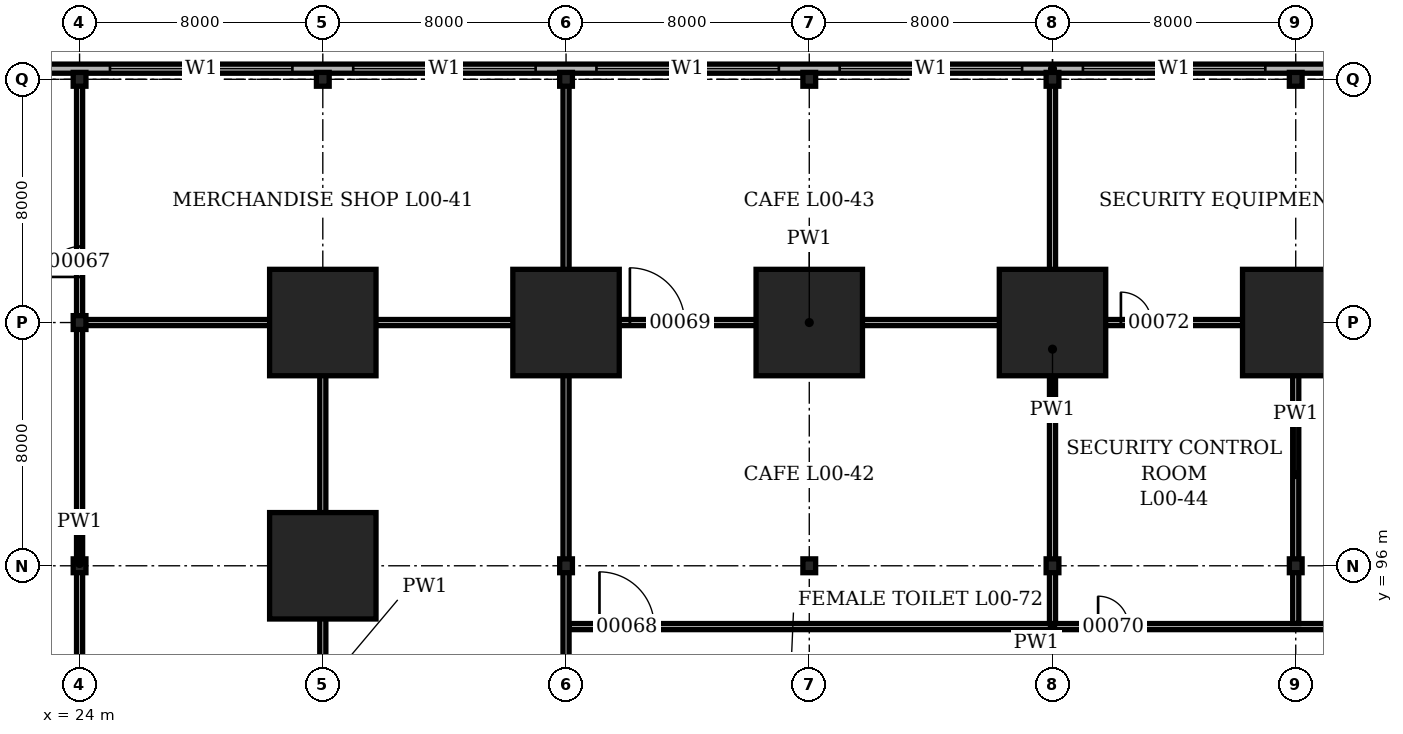
"""IFC4 building model, lengths in metres.
Left out: names, types, materials, properties, quantities, classifications, styles, units other than length and angle.
Written with IfcOpenShell. Run it as: python <this file> out.ifc"""

import sys

from ifc_helpers import new_model, si_unit, direction, frame, frame_2d, origin, origin_2d, place, context, subcontext, project, spatial, rectangle, hollow_rectangle, i_section, extrude, element, fill, save


model = new_model("IFC4")
c1 = context("Model", 3, precision=1e-05, world=origin(), true_north=direction((0.0, 1.0)))
c2 = subcontext(c1, "Body", "Model", "MODEL_VIEW")
j1 = project(units=[si_unit("LENGTHUNIT", "METRE"), si_unit("PLANEANGLEUNIT", "RADIAN")], contexts=[c1])
p1 = place(None, origin())
s1 = spatial("IfcSite", under=j1, at=p1, CompositionType="ELEMENT")
p2 = place(p1, origin())
s2 = spatial("IfcBuilding", under=s1, at=p2, CompositionType="ELEMENT")
p3 = place(p2, origin())
s3 = spatial("IfcBuildingStorey", under=s2, at=p3, CompositionType="ELEMENT", Elevation=0.0)
for number, where, z_axis, x_axis in (
    (1, (24.0, 96.0, 0.0), (0.0, 0.0, 1.0), (1.0, 0.0, 0.0)),
    (2, (24.0, 104.0, 0.0), (0.0, 0.0, 1.0), (1.0, 0.0, 0.0)),
    (3, (24.0, 112.0, 0.0), (0.0, 0.0, 1.0), (1.0, 0.0, 0.0)),
):
    element("IfcColumn", number, at=place(p3, frame(where, z_axis=z_axis, x_axis=x_axis)), inside=s3, PredefinedType="COLUMN", context=c2, shape_type="SweptSolid", body=[
        extrude(i_section(OverallWidth=0.419, OverallDepth=0.455, WebThickness=0.042, FlangeThickness=0.068, at=origin_2d()), origin(), (0.0, 0.0, 1.0), 4.9),
    ])
for number, where, z_axis, x_axis in (
    (4, (32.0, 96.0, 0.0), (0.0, 0.0, 1.0), (1.0, 0.0, 0.0)),
    (5, (32.0, 104.0, 0.0), (0.0, 0.0, 1.0), (1.0, 0.0, 0.0)),
):
    element("IfcColumn", number, at=place(p3, frame(where, z_axis=z_axis, x_axis=x_axis)), inside=s3, PredefinedType="COLUMN", context=c2, shape_type="SweptSolid", body=[
        extrude(hollow_rectangle(XDim=3.5, YDim=3.5, WallThickness=0.5, at=origin_2d()), origin(), (0.0, 0.0, 1.0), 4.9),
    ])
for number, where, z_axis, x_axis in (
    (6, (32.0, 112.0, 0.0), (0.0, 0.0, 1.0), (1.0, 0.0, 0.0)),
    (7, (40.0, 96.0, 0.0), (0.0, 0.0, 1.0), (1.0, 0.0, 0.0)),
):
    element("IfcColumn", number, at=place(p3, frame(where, z_axis=z_axis, x_axis=x_axis)), inside=s3, PredefinedType="COLUMN", context=c2, shape_type="SweptSolid", body=[
        extrude(i_section(OverallWidth=0.419, OverallDepth=0.455, WebThickness=0.042, FlangeThickness=0.068, at=origin_2d()), origin(), (0.0, 0.0, 1.0), 4.9),
    ])
p4 = place(p3, frame((40.0, 104.0, 0.0), z_axis=(0.0, 0.0, 1.0), x_axis=(1.0, 0.0, 0.0)))
e8 = element("IfcColumn", 8, at=p4, inside=s3, PredefinedType="COLUMN", context=c2, shape_type="SweptSolid", body=[
    extrude(hollow_rectangle(XDim=3.5, YDim=3.5, WallThickness=0.5, at=origin_2d()), origin(), (0.0, 0.0, 1.0), 4.9),
])
for number, where, z_axis, x_axis in (
    (9, (40.0, 112.0, 0.0), (0.0, 0.0, 1.0), (1.0, 0.0, 0.0)),
    (10, (48.0, 96.0, 0.0), (0.0, 0.0, 1.0), (1.0, 0.0, 0.0)),
):
    element("IfcColumn", number, at=place(p3, frame(where, z_axis=z_axis, x_axis=x_axis)), inside=s3, PredefinedType="COLUMN", context=c2, shape_type="SweptSolid", body=[
        extrude(i_section(OverallWidth=0.419, OverallDepth=0.455, WebThickness=0.042, FlangeThickness=0.068, at=origin_2d()), origin(), (0.0, 0.0, 1.0), 4.9),
    ])
p5 = place(p3, frame((48.0, 104.0, 0.0), z_axis=(0.0, 0.0, 1.0), x_axis=(1.0, 0.0, 0.0)))
e11 = element("IfcColumn", 11, at=p5, inside=s3, PredefinedType="COLUMN", context=c2, shape_type="SweptSolid", body=[
    extrude(hollow_rectangle(XDim=3.5, YDim=3.5, WallThickness=0.5, at=origin_2d()), origin(), (0.0, 0.0, 1.0), 4.9),
])
for number, where, z_axis, x_axis in (
    (12, (48.0, 112.0, 0.0), (0.0, 0.0, 1.0), (1.0, 0.0, 0.0)),
    (13, (56.0, 96.0, 0.0), (0.0, 0.0, 1.0), (1.0, 0.0, 0.0)),
):
    element("IfcColumn", number, at=place(p3, frame(where, z_axis=z_axis, x_axis=x_axis)), inside=s3, PredefinedType="COLUMN", context=c2, shape_type="SweptSolid", body=[
        extrude(i_section(OverallWidth=0.419, OverallDepth=0.455, WebThickness=0.042, FlangeThickness=0.068, at=origin_2d()), origin(), (0.0, 0.0, 1.0), 4.9),
    ])
p6 = place(p3, frame((56.0, 104.0, 0.0), z_axis=(0.0, 0.0, 1.0), x_axis=(1.0, 0.0, 0.0)))
e14 = element("IfcColumn", 14, at=p6, inside=s3, PredefinedType="COLUMN", context=c2, shape_type="SweptSolid", body=[
    extrude(hollow_rectangle(XDim=3.5, YDim=3.5, WallThickness=0.5, at=origin_2d()), origin(), (0.0, 0.0, 1.0), 4.9),
])
for number, where, z_axis, x_axis in (
    (15, (56.0, 112.0, 0.0), (0.0, 0.0, 1.0), (1.0, 0.0, 0.0)),
    (16, (64.0, 96.0, 0.0), (0.0, 0.0, 1.0), (1.0, 0.0, 0.0)),
):
    element("IfcColumn", number, at=place(p3, frame(where, z_axis=z_axis, x_axis=x_axis)), inside=s3, PredefinedType="COLUMN", context=c2, shape_type="SweptSolid", body=[
        extrude(i_section(OverallWidth=0.419, OverallDepth=0.455, WebThickness=0.042, FlangeThickness=0.068, at=origin_2d()), origin(), (0.0, 0.0, 1.0), 4.9),
    ])
p7 = place(p3, frame((64.0, 104.0, 0.0), z_axis=(0.0, 0.0, 1.0), x_axis=(1.0, 0.0, 0.0)))
e17 = element("IfcColumn", 17, at=p7, inside=s3, PredefinedType="COLUMN", context=c2, shape_type="SweptSolid", body=[
    extrude(hollow_rectangle(XDim=3.5, YDim=3.5, WallThickness=0.5, at=origin_2d()), origin(), (0.0, 0.0, 1.0), 4.9),
])
p8 = place(p3, frame((64.0, 112.0, 0.0), z_axis=(0.0, 0.0, 1.0), x_axis=(1.0, 0.0, 0.0)))
e18 = element("IfcColumn", 18, at=p8, inside=s3, PredefinedType="COLUMN", context=c2, shape_type="SweptSolid", body=[
    extrude(i_section(OverallWidth=0.419, OverallDepth=0.455, WebThickness=0.042, FlangeThickness=0.068, at=origin_2d()), origin(), (0.0, 0.0, 1.0), 4.9),
])
p9 = place(p3, frame((112.35, 112.35, 0.0), z_axis=(0.0, 0.0, 1.0), x_axis=(-1.0, 0.0, 0.0)))
e19 = element("IfcWall", 19, at=p9, inside=s3, PredefinedType="SOLIDWALL", context=c2, shape_type="SweptSolid", body=[
    extrude(rectangle(XDim=112.7, YDim=0.3, at=frame_2d((56.35, 0.0))), origin(), (0.0, 0.0, 1.0), 4.9),
])
p10 = place(p9, frame((1.35, 0.0, 1.2)))
e20 = element("IfcOpeningElement", 20, at=p10, cuts=e19, PredefinedType="OPENING", context=c2, shape_type="SweptSolid", body=[
    extrude(rectangle(XDim=6.0, YDim=1.5, at=frame_2d((3.0, 0.75))), frame((0.0, 0.16, 0.0), z_axis=(0.0, -1.0, 0.0), x_axis=(1.0, 0.0, 0.0)), (0.0, 0.0, 1.0), 0.32),
])
p11 = place(p9, frame((9.35, 0.0, 1.2)))
e21 = element("IfcOpeningElement", 21, at=p11, cuts=e19, PredefinedType="OPENING", context=c2, shape_type="SweptSolid", body=[
    extrude(rectangle(XDim=6.0, YDim=1.5, at=frame_2d((3.0, 0.75))), frame((0.0, 0.16, 0.0), z_axis=(0.0, -1.0, 0.0), x_axis=(1.0, 0.0, 0.0)), (0.0, 0.0, 1.0), 0.32),
])
p12 = place(p9, frame((17.35, 0.0, 1.2)))
e22 = element("IfcOpeningElement", 22, at=p12, cuts=e19, PredefinedType="OPENING", context=c2, shape_type="SweptSolid", body=[
    extrude(rectangle(XDim=6.0, YDim=1.5, at=frame_2d((3.0, 0.75))), frame((0.0, 0.16, 0.0), z_axis=(0.0, -1.0, 0.0), x_axis=(1.0, 0.0, 0.0)), (0.0, 0.0, 1.0), 0.32),
])
p13 = place(p9, frame((25.35, 0.0, 1.2)))
e23 = element("IfcOpeningElement", 23, at=p13, cuts=e19, PredefinedType="OPENING", context=c2, shape_type="SweptSolid", body=[
    extrude(rectangle(XDim=6.0, YDim=1.5, at=frame_2d((3.0, 0.75))), frame((0.0, 0.16, 0.0), z_axis=(0.0, -1.0, 0.0), x_axis=(1.0, 0.0, 0.0)), (0.0, 0.0, 1.0), 0.32),
])
p14 = place(p9, frame((33.35, 0.0, 1.2)))
e24 = element("IfcOpeningElement", 24, at=p14, cuts=e19, PredefinedType="OPENING", context=c2, shape_type="SweptSolid", body=[
    extrude(rectangle(XDim=6.0, YDim=1.5, at=frame_2d((3.0, 0.75))), frame((0.0, 0.16, 0.0), z_axis=(0.0, -1.0, 0.0), x_axis=(1.0, 0.0, 0.0)), (0.0, 0.0, 1.0), 0.32),
])
p15 = place(p9, frame((41.35, 0.0, 1.2)))
e25 = element("IfcOpeningElement", 25, at=p15, cuts=e19, PredefinedType="OPENING", context=c2, shape_type="SweptSolid", body=[
    extrude(rectangle(XDim=6.0, YDim=1.5, at=frame_2d((3.0, 0.75))), frame((0.0, 0.16, 0.0), z_axis=(0.0, -1.0, 0.0), x_axis=(1.0, 0.0, 0.0)), (0.0, 0.0, 1.0), 0.32),
])
p16 = place(p9, frame((49.35, 0.0, 1.2)))
e26 = element("IfcOpeningElement", 26, at=p16, cuts=e19, PredefinedType="OPENING", context=c2, shape_type="SweptSolid", body=[
    extrude(rectangle(XDim=6.0, YDim=1.5, at=frame_2d((3.0, 0.75))), frame((0.0, 0.16, 0.0), z_axis=(0.0, -1.0, 0.0), x_axis=(1.0, 0.0, 0.0)), (0.0, 0.0, 1.0), 0.32),
])
p17 = place(p9, frame((57.35, 0.0, 1.2)))
e27 = element("IfcOpeningElement", 27, at=p17, cuts=e19, PredefinedType="OPENING", context=c2, shape_type="SweptSolid", body=[
    extrude(rectangle(XDim=6.0, YDim=1.5, at=frame_2d((3.0, 0.75))), frame((0.0, 0.16, 0.0), z_axis=(0.0, -1.0, 0.0), x_axis=(1.0, 0.0, 0.0)), (0.0, 0.0, 1.0), 0.32),
])
p18 = place(p9, frame((65.35, 0.0, 1.2)))
e28 = element("IfcOpeningElement", 28, at=p18, cuts=e19, PredefinedType="OPENING", context=c2, shape_type="SweptSolid", body=[
    extrude(rectangle(XDim=6.0, YDim=1.5, at=frame_2d((3.0, 0.75))), frame((0.0, 0.16, 0.0), z_axis=(0.0, -1.0, 0.0), x_axis=(1.0, 0.0, 0.0)), (0.0, 0.0, 1.0), 0.32),
])
p19 = place(p9, frame((73.35, 0.0, 1.2)))
e29 = element("IfcOpeningElement", 29, at=p19, cuts=e19, PredefinedType="OPENING", context=c2, shape_type="SweptSolid", body=[
    extrude(rectangle(XDim=6.0, YDim=1.5, at=frame_2d((3.0, 0.75))), frame((0.0, 0.16, 0.0), z_axis=(0.0, -1.0, 0.0), x_axis=(1.0, 0.0, 0.0)), (0.0, 0.0, 1.0), 0.32),
])
p20 = place(p9, frame((81.35, 0.0, 1.2)))
e30 = element("IfcOpeningElement", 30, at=p20, cuts=e19, PredefinedType="OPENING", context=c2, shape_type="SweptSolid", body=[
    extrude(rectangle(XDim=6.0, YDim=1.5, at=frame_2d((3.0, 0.75))), frame((0.0, 0.16, 0.0), z_axis=(0.0, -1.0, 0.0), x_axis=(1.0, 0.0, 0.0)), (0.0, 0.0, 1.0), 0.32),
])
p21 = place(p9, frame((89.35, 0.0, 1.2)))
e31 = element("IfcOpeningElement", 31, at=p21, cuts=e19, PredefinedType="OPENING", context=c2, shape_type="SweptSolid", body=[
    extrude(rectangle(XDim=6.0, YDim=1.5, at=frame_2d((3.0, 0.75))), frame((0.0, 0.16, 0.0), z_axis=(0.0, -1.0, 0.0), x_axis=(1.0, 0.0, 0.0)), (0.0, 0.0, 1.0), 0.32),
])
p22 = place(p9, frame((97.35, 0.0, 1.2)))
e32 = element("IfcOpeningElement", 32, at=p22, cuts=e19, PredefinedType="OPENING", context=c2, shape_type="SweptSolid", body=[
    extrude(rectangle(XDim=6.0, YDim=1.5, at=frame_2d((3.0, 0.75))), frame((0.0, 0.16, 0.0), z_axis=(0.0, -1.0, 0.0), x_axis=(1.0, 0.0, 0.0)), (0.0, 0.0, 1.0), 0.32),
])
p23 = place(p9, frame((105.35, 0.0, 1.2)))
e33 = element("IfcOpeningElement", 33, at=p23, cuts=e19, PredefinedType="OPENING", context=c2, shape_type="SweptSolid", body=[
    extrude(rectangle(XDim=6.0, YDim=1.5, at=frame_2d((3.0, 0.75))), frame((0.0, 0.16, 0.0), z_axis=(0.0, -1.0, 0.0), x_axis=(1.0, 0.0, 0.0)), (0.0, 0.0, 1.0), 0.32),
])
p24 = place(p3, frame((40.1, 94.0, 0.0), z_axis=(0.0, 0.0, 1.0), x_axis=(1.0, 0.0, 0.0)))
e34 = element("IfcWall", 34, at=p24, inside=s3, PredefinedType="PARTITIONING", context=c2, shape_type="SweptSolid", body=[
    extrude(rectangle(XDim=31.8, YDim=0.2, at=frame_2d((15.9, 0.0))), origin(), (0.0, 0.0, 1.0), 4.7),
])
p25 = place(p24, frame((1.0, 0.0, 0.0)))
e35 = element("IfcOpeningElement", 35, at=p25, cuts=e34, PredefinedType="OPENING", context=c2, shape_type="SweptSolid", body=[
    extrude(rectangle(XDim=1.8, YDim=2.4, at=frame_2d((0.9, 1.2))), frame((0.0, 0.11, 0.0), z_axis=(0.0, -1.0, 0.0), x_axis=(1.0, 0.0, 0.0)), (0.0, 0.0, 1.0), 0.22),
])
p26 = place(p24, frame((17.4, 0.0, 0.0)))
e36 = element("IfcOpeningElement", 36, at=p26, cuts=e34, PredefinedType="OPENING", context=c2, shape_type="SweptSolid", body=[
    extrude(rectangle(XDim=1.0, YDim=2.1, at=frame_2d((0.5, 1.05))), frame((0.0, 0.11, 0.0), z_axis=(0.0, -1.0, 0.0), x_axis=(1.0, 0.0, 0.0)), (0.0, 0.0, 1.0), 0.22),
])
p27 = place(p24, frame((25.4, 0.0, 0.0)))
e37 = element("IfcOpeningElement", 37, at=p27, cuts=e34, PredefinedType="OPENING", context=c2, shape_type="SweptSolid", body=[
    extrude(rectangle(XDim=1.0, YDim=2.1, at=frame_2d((0.5, 1.05))), frame((0.0, 0.11, 0.0), z_axis=(0.0, -1.0, 0.0), x_axis=(1.0, 0.0, 0.0)), (0.0, 0.0, 1.0), 0.22),
])
p28 = place(p3, frame((24.1, 104.0, 0.0), z_axis=(0.0, 0.0, 1.0), x_axis=(1.0, 0.0, 0.0)))
e38 = element("IfcWall", 38, at=p28, inside=s3, PredefinedType="PARTITIONING", context=c2, shape_type="SweptSolid", body=[
    extrude(rectangle(XDim=47.8, YDim=0.2, at=frame_2d((23.9, 0.0))), origin(), (0.0, 0.0, 1.0), 3.928),
])
p29 = place(p28, frame((18.0, 0.0, 0.0)))
e39 = element("IfcOpeningElement", 39, at=p29, cuts=e38, PredefinedType="OPENING", context=c2, shape_type="SweptSolid", body=[
    extrude(rectangle(XDim=1.8, YDim=2.4, at=frame_2d((0.9, 1.2))), frame((0.0, 0.11, 0.0), z_axis=(0.0, -1.0, 0.0), x_axis=(1.0, 0.0, 0.0)), (0.0, 0.0, 1.0), 0.22),
])
p30 = place(p28, frame((34.15, 0.0, 0.0)))
e40 = element("IfcOpeningElement", 40, at=p30, cuts=e38, PredefinedType="OPENING", context=c2, shape_type="SweptSolid", body=[
    extrude(rectangle(XDim=1.0, YDim=2.1, at=frame_2d((0.5, 1.05))), frame((0.0, 0.11, 0.0), z_axis=(0.0, -1.0, 0.0), x_axis=(1.0, 0.0, 0.0)), (0.0, 0.0, 1.0), 0.22),
])
p31 = place(p3, frame((24.0, 80.0, 0.0), z_axis=(0.0, 0.0, 1.0), x_axis=(0.0, 1.0, 0.0)))
e41 = element("IfcWall", 41, at=p31, inside=s3, PredefinedType="PARTITIONING", context=c2, shape_type="SweptSolid", body=[
    extrude(rectangle(XDim=32.15, YDim=0.2, at=frame_2d((16.075, 0.0))), origin(), (0.0, 0.0, 1.0), 3.928),
])
p32 = place(p31, frame((1.1, 0.0, 0.0)))
e42 = element("IfcOpeningElement", 42, at=p32, cuts=e41, PredefinedType="OPENING", context=c2, shape_type="SweptSolid", body=[
    extrude(rectangle(XDim=1.8, YDim=2.4, at=frame_2d((0.9, 1.2))), frame((0.0, 0.11, 0.0), z_axis=(0.0, -1.0, 0.0), x_axis=(1.0, 0.0, 0.0)), (0.0, 0.0, 1.0), 0.22),
])
p33 = place(p31, frame((25.5, 0.0, 0.0)))
e43 = element("IfcOpeningElement", 43, at=p33, cuts=e41, PredefinedType="OPENING", context=c2, shape_type="SweptSolid", body=[
    extrude(rectangle(XDim=1.0, YDim=2.1, at=frame_2d((0.5, 1.05))), frame((0.0, 0.11, 0.0), z_axis=(0.0, -1.0, 0.0), x_axis=(1.0, 0.0, 0.0)), (0.0, 0.0, 1.0), 0.22),
])
p34 = place(p3, frame((32.0, 80.0, 0.0), z_axis=(0.0, 0.0, 1.0), x_axis=(0.0, 1.0, 0.0)))
e44 = element("IfcWall", 44, at=p34, inside=s3, PredefinedType="PARTITIONING", context=c2, shape_type="SweptSolid", body=[
    extrude(rectangle(XDim=23.9, YDim=0.2, at=frame_2d((11.95, 0.0))), origin(), (0.0, 0.0, 1.0), 3.928),
])
p35 = place(p3, frame((40.0, 72.1, 0.0), z_axis=(0.0, 0.0, 1.0), x_axis=(0.0, 1.0, 0.0)))
e45 = element("IfcWall", 45, at=p35, inside=s3, PredefinedType="PARTITIONING", context=c2, shape_type="SweptSolid", body=[
    extrude(rectangle(XDim=40.05, YDim=0.2, at=frame_2d((20.025, 0.0))), origin(), (0.0, 0.0, 1.0), 3.928),
])
p36 = place(p35, frame((9.0, 0.0, 0.0)))
e46 = element("IfcOpeningElement", 46, at=p36, cuts=e45, PredefinedType="OPENING", context=c2, shape_type="SweptSolid", body=[
    extrude(rectangle(XDim=1.8, YDim=2.4, at=frame_2d((0.9, 1.2))), frame((0.0, 0.11, 0.0), z_axis=(0.0, -1.0, 0.0), x_axis=(1.0, 0.0, 0.0)), (0.0, 0.0, 1.0), 0.22),
])
p37 = place(p3, frame((56.0, 94.1, 0.0), z_axis=(0.0, 0.0, 1.0), x_axis=(0.0, 1.0, 0.0)))
e47 = element("IfcWall", 47, at=p37, inside=s3, PredefinedType="PARTITIONING", context=c2, shape_type="SweptSolid", body=[
    extrude(rectangle(XDim=18.05, YDim=0.2, at=frame_2d((9.025, 0.0))), origin(), (0.0, 0.0, 1.0), 3.928),
])
p38 = place(p3, frame((64.0, 94.1, 0.0), z_axis=(0.0, 0.0, 1.0), x_axis=(0.0, 1.0, 0.0)))
e48 = element("IfcWall", 48, at=p38, inside=s3, PredefinedType="PARTITIONING", context=c2, shape_type="SweptSolid", body=[
    extrude(rectangle(XDim=9.8, YDim=0.2, at=frame_2d((4.9, 0.0))), origin(), (0.0, 0.0, 1.0), 3.928),
])
p39 = place(p16, origin())
e49 = element("IfcWindow", 49, at=p39, inside=s3, PartitioningType="SINGLE_PANEL", PredefinedType="WINDOW", context=c2, shape_type="SweptSolid", body=[
    extrude(rectangle(XDim=6.0, YDim=1.5, at=frame_2d((3.0, 0.75))), frame((0.0, 0.03, 0.0), z_axis=(0.0, -1.0, 0.0), x_axis=(1.0, 0.0, 0.0)), (0.0, 0.0, 1.0), 0.06),
])
fill(e26, e49)
p40 = place(p17, origin())
e50 = element("IfcWindow", 50, at=p40, inside=s3, PartitioningType="SINGLE_PANEL", PredefinedType="WINDOW", context=c2, shape_type="SweptSolid", body=[
    extrude(rectangle(XDim=6.0, YDim=1.5, at=frame_2d((3.0, 0.75))), frame((0.0, 0.03, 0.0), z_axis=(0.0, -1.0, 0.0), x_axis=(1.0, 0.0, 0.0)), (0.0, 0.0, 1.0), 0.06),
])
fill(e27, e50)
p41 = place(p18, origin())
e51 = element("IfcWindow", 51, at=p41, inside=s3, PartitioningType="SINGLE_PANEL", PredefinedType="WINDOW", context=c2, shape_type="SweptSolid", body=[
    extrude(rectangle(XDim=6.0, YDim=1.5, at=frame_2d((3.0, 0.75))), frame((0.0, 0.03, 0.0), z_axis=(0.0, -1.0, 0.0), x_axis=(1.0, 0.0, 0.0)), (0.0, 0.0, 1.0), 0.06),
])
fill(e28, e51)
p42 = place(p19, origin())
e52 = element("IfcWindow", 52, at=p42, inside=s3, PartitioningType="SINGLE_PANEL", PredefinedType="WINDOW", context=c2, shape_type="SweptSolid", body=[
    extrude(rectangle(XDim=6.0, YDim=1.5, at=frame_2d((3.0, 0.75))), frame((0.0, 0.03, 0.0), z_axis=(0.0, -1.0, 0.0), x_axis=(1.0, 0.0, 0.0)), (0.0, 0.0, 1.0), 0.06),
])
fill(e29, e52)
p43 = place(p20, origin())
e53 = element("IfcWindow", 53, at=p43, inside=s3, PartitioningType="SINGLE_PANEL", PredefinedType="WINDOW", context=c2, shape_type="SweptSolid", body=[
    extrude(rectangle(XDim=6.0, YDim=1.5, at=frame_2d((3.0, 0.75))), frame((0.0, 0.03, 0.0), z_axis=(0.0, -1.0, 0.0), x_axis=(1.0, 0.0, 0.0)), (0.0, 0.0, 1.0), 0.06),
])
fill(e30, e53)
p44 = place(p33, origin())
e54 = element("IfcDoor", 54, at=p44, inside=s3, OperationType="SINGLE_SWING_LEFT", PredefinedType="DOOR", context=c2, shape_type="SweptSolid", body=[
    extrude(rectangle(XDim=1.0, YDim=2.1, at=frame_2d((0.5, 1.05))), frame((0.0, 0.1, 0.0), z_axis=(0.0, -1.0, 0.0), x_axis=(1.0, 0.0, 0.0)), (0.0, 0.0, 1.0), 0.199),
])
fill(e43, e54)
p45 = place(p25, origin())
e55 = element("IfcDoor", 55, at=p45, inside=s3, OperationType="DOUBLE_DOOR_DOUBLE_SWING", PredefinedType="DOOR", context=c2, shape_type="SweptSolid", body=[
    extrude(rectangle(XDim=1.8, YDim=2.4, at=frame_2d((0.9, 1.2))), frame((0.0, 0.1, 0.0), z_axis=(0.0, -1.0, 0.0), x_axis=(1.0, 0.0, 0.0)), (0.0, 0.0, 1.0), 0.199),
])
fill(e35, e55)
p46 = place(p29, origin())
e56 = element("IfcDoor", 56, at=p46, inside=s3, OperationType="DOUBLE_DOOR_DOUBLE_SWING", PredefinedType="DOOR", context=c2, shape_type="SweptSolid", body=[
    extrude(rectangle(XDim=1.8, YDim=2.4, at=frame_2d((0.9, 1.2))), frame((0.0, 0.1, 0.0), z_axis=(0.0, -1.0, 0.0), x_axis=(1.0, 0.0, 0.0)), (0.0, 0.0, 1.0), 0.199),
])
fill(e39, e56)
p47 = place(p26, origin())
e57 = element("IfcDoor", 57, at=p47, inside=s3, OperationType="SINGLE_SWING_LEFT", PredefinedType="DOOR", context=c2, shape_type="SweptSolid", body=[
    extrude(rectangle(XDim=1.0, YDim=2.1, at=frame_2d((0.5, 1.05))), frame((0.0, 0.1, 0.0), z_axis=(0.0, -1.0, 0.0), x_axis=(1.0, 0.0, 0.0)), (0.0, 0.0, 1.0), 0.199),
])
fill(e36, e57)
p48 = place(p30, origin())
e58 = element("IfcDoor", 58, at=p48, inside=s3, OperationType="SINGLE_SWING_LEFT", PredefinedType="DOOR", context=c2, shape_type="SweptSolid", body=[
    extrude(rectangle(XDim=1.0, YDim=2.1, at=frame_2d((0.5, 1.05))), frame((0.0, 0.1, 0.0), z_axis=(0.0, -1.0, 0.0), x_axis=(1.0, 0.0, 0.0)), (0.0, 0.0, 1.0), 0.199),
])
fill(e40, e58)
save(model, sys.argv[1])
